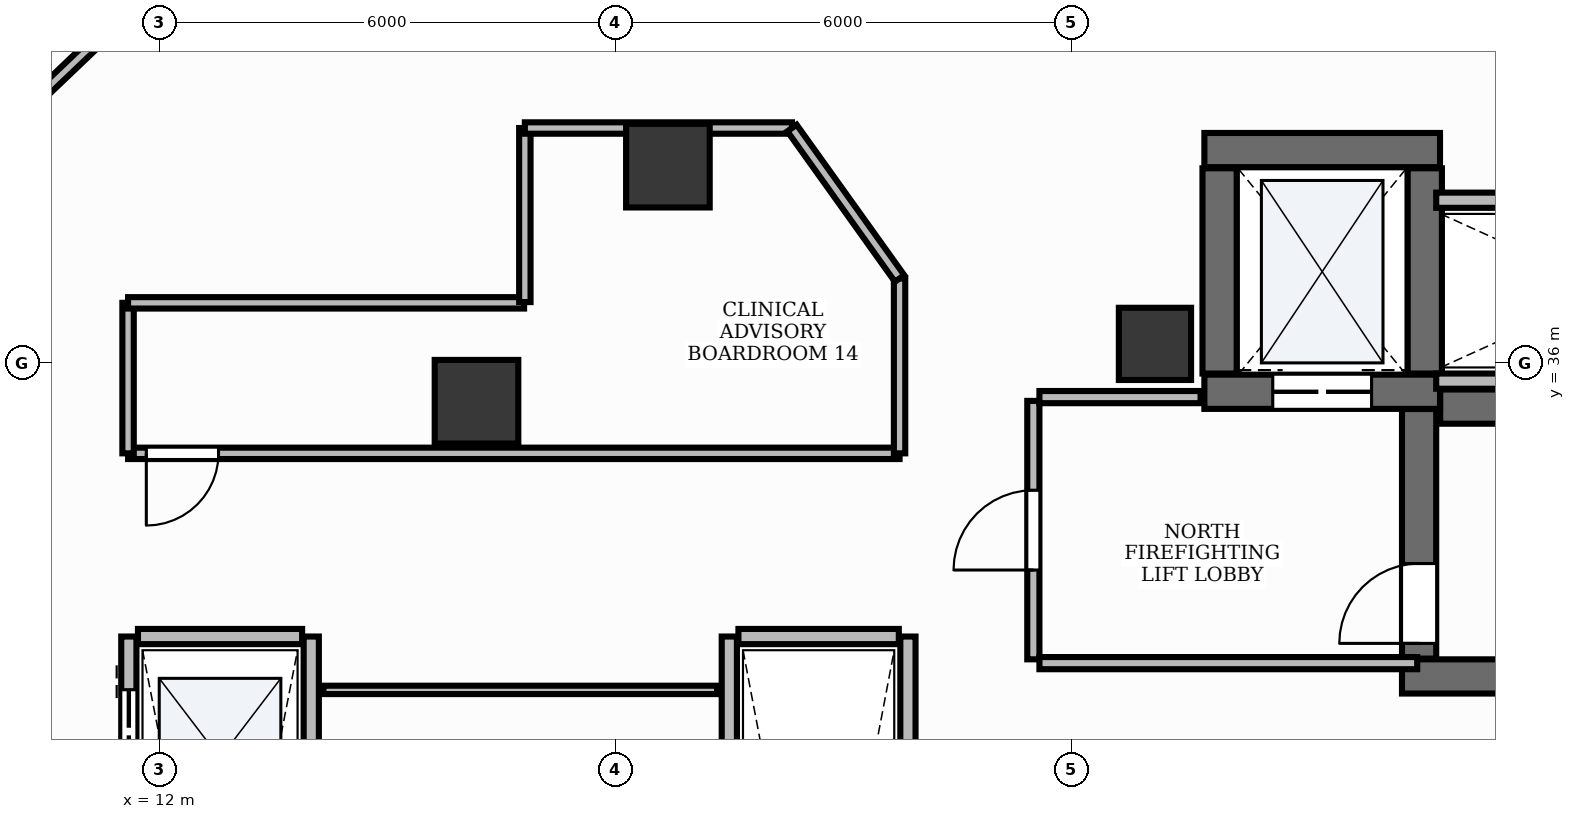
"""IFC4 building model, lengths in metres.
Left out: names, types, materials, properties, quantities, classifications, styles, units other than length and angle.
Written with IfcOpenShell. Run it as: python <this file> out.ifc"""

import sys

from ifc_helpers import new_model, si_unit, direction, frame, frame_2d, origin, origin_2d, place, context, subcontext, project, spatial, rectangle, extrude, element, fill, save


model = new_model("IFC4")
c1 = context("Model", 3, precision=1e-05, world=origin(), true_north=direction((0.0, 1.0)))
c2 = subcontext(c1, "Body", "Model", "MODEL_VIEW")
j1 = project(units=[si_unit("LENGTHUNIT", "METRE"), si_unit("PLANEANGLEUNIT", "RADIAN")], contexts=[c1])
p1 = place(None, origin())
s1 = spatial("IfcSite", under=j1, at=p1, CompositionType="ELEMENT")
p2 = place(p1, origin())
s2 = spatial("IfcBuilding", under=s1, at=p2, CompositionType="ELEMENT")
p3 = place(p2, frame((0.0, 0.0, 38.4)))
s3 = spatial("IfcBuildingStorey", under=s2, at=p3, CompositionType="ELEMENT", Elevation=38.4)
p4 = place(p3, frame((28.852, 35.425, 0.0), z_axis=(0.0, 0.0, 1.0), x_axis=(1.0, 0.0, 0.0)))
e1 = element("IfcWall", 1, at=p4, inside=s3, PredefinedType="SHEAR", context=c2, shape_type="SweptSolid", body=[
    extrude(rectangle(XDim=8.248, YDim=0.45, at=frame_2d((4.124, 0.0))), origin(), (0.0, 0.0, 1.0), 3.9),
])
p5 = place(p3, frame((28.35, 31.875, 0.0), z_axis=(0.0, 0.0, 1.0), x_axis=(1.0, 0.0, 0.0)))
e2 = element("IfcWall", 2, at=p5, inside=s3, PredefinedType="SHEAR", context=c2, shape_type="SweptSolid", body=[
    extrude(rectangle(XDim=8.75, YDim=0.45, at=frame_2d((4.375, 0.0))), origin(), (0.0, 0.0, 1.0), 3.9),
])
p6 = place(p3, frame((28.575, 32.11, 0.0), z_axis=(0.0, 0.0, 1.0), x_axis=(0.0, 1.0, 0.0)))
e3 = element("IfcWall", 3, at=p6, inside=s3, PredefinedType="SHEAR", context=c2, shape_type="SweptSolid", body=[
    extrude(rectangle(XDim=3.283, YDim=0.45, at=frame_2d((1.642, 0.0))), origin(), (0.0, 0.0, 1.0), 3.9),
])
p7 = place(p6, frame((0.2, 0.0, 0.0)))
e4 = element("IfcOpeningElement", 4, at=p7, cuts=e3, PredefinedType="OPENING", context=c2, shape_type="SweptSolid", body=[
    extrude(rectangle(XDim=1.05, YDim=2.15, at=frame_2d((0.525, 1.075))), frame((0.0, 0.24, 0.0), z_axis=(0.0, -1.0, 0.0), x_axis=(1.0, 0.0, 0.0)), (0.0, 0.0, 1.0), 0.48),
])
p8 = place(p3, frame((25.75, 38.8, 0.0), z_axis=(0.0, 0.0, 1.0), x_axis=(1.0, 0.0, 0.0)))
e5 = element("IfcWall", 5, at=p8, inside=s3, PredefinedType="SHEAR", context=c2, shape_type="SweptSolid", body=[
    extrude(rectangle(XDim=3.1, YDim=0.45, at=frame_2d((1.55, 0.0))), origin(), (0.0, 0.0, 1.0), 3.9),
])
p9 = place(p3, frame((25.75, 35.62, 0.0), z_axis=(0.0, 0.0, 1.0), x_axis=(1.0, 0.0, 0.0)))
e6 = element("IfcWall", 6, at=p9, inside=s3, PredefinedType="SHEAR", context=c2, shape_type="SweptSolid", body=[
    extrude(rectangle(XDim=3.1, YDim=0.45, at=frame_2d((1.55, 0.0))), origin(), (0.0, 0.0, 1.0), 3.9),
])
p10 = place(p9, frame((0.9, 0.0, 0.0)))
e7 = element("IfcOpeningElement", 7, at=p10, cuts=e6, PredefinedType="OPENING", context=c2, shape_type="SweptSolid", body=[
    extrude(rectangle(XDim=1.3, YDim=2.2, at=frame_2d((0.65, 1.1))), frame((0.0, 0.24, 0.0), z_axis=(0.0, -1.0, 0.0), x_axis=(1.0, 0.0, 0.0)), (0.0, 0.0, 1.0), 0.48),
])
for number, where, z_axis, x_axis in (
    (8, (25.95, 35.86, 0.0), (0.0, 0.0, 1.0), (0.0, 1.0, 0.0)),
    (9, (28.65, 35.86, 0.0), (0.0, 0.0, 1.0), (0.0, 1.0, 0.0)),
):
    element("IfcWall", number, at=place(p3, frame(where, z_axis=z_axis, x_axis=x_axis)), inside=s3, PredefinedType="SHEAR", context=c2, shape_type="SweptSolid", body=[
        extrude(rectangle(XDim=2.7, YDim=0.45, at=frame_2d((1.35, 0.0))), origin(), (0.0, 0.0, 1.0), 3.9),
    ])
p11 = place(p3, frame((25.1, 36.25, -0.0), z_axis=(0.0, 0.0, 1.0), x_axis=(1.0, 0.0, 0.0)))
e10 = element("IfcColumn", 10, at=p11, inside=s3, PredefinedType="PILASTER", context=c2, shape_type="SweptSolid", body=[
    extrude(rectangle(XDim=0.95, YDim=0.95, at=origin_2d()), origin(), (0.0, 0.0, 1.0), 3.901),
])
for number, where, z_axis, x_axis in (
    (11, (18.692, 38.595, -0.0), (0.0, 0.0, 1.0), (1.0, 0.0, 0.0)),
    (12, (16.174, 35.489, -0.0), (0.0, 0.0, 1.0), (1.0, 0.0, 0.0)),
):
    element("IfcColumn", number, at=place(p3, frame(where, z_axis=z_axis, x_axis=x_axis)), inside=s3, PredefinedType="COLUMN", context=c2, shape_type="SweptSolid", body=[
        extrude(rectangle(XDim=1.1, YDim=1.1, at=origin_2d()), origin(), (0.0, 0.0, 1.0), 3.901),
    ])
p12 = place(p3, frame((11.6, 21.6, 0.0), z_axis=(0.0, 0.0, 1.0), x_axis=(0.0, 1.0, 0.0)))
e13 = element("IfcWall", 13, at=p12, inside=s3, PredefinedType="PARTITIONING", context=c2, shape_type="SweptSolid", body=[
    extrude(rectangle(XDim=10.8, YDim=0.2, at=frame_2d((5.4, 0.0))), origin(), (0.0, 0.0, 1.0), 2.91),
])
p13 = place(p12, frame((0.9, 0.0, 0.0)))
e14 = element("IfcOpeningElement", 14, at=p13, cuts=e13, PredefinedType="OPENING", context=c2, shape_type="SweptSolid", body=[
    extrude(rectangle(XDim=1.1, YDim=2.2, at=frame_2d((0.55, 1.1))), frame((0.0, 0.115, 0.0), z_axis=(0.0, -1.0, 0.0), x_axis=(1.0, 0.0, 0.0)), (0.0, 0.0, 1.0), 0.23),
])
p14 = place(p12, frame((3.6, 0.0, 0.0)))
e15 = element("IfcOpeningElement", 15, at=p14, cuts=e13, PredefinedType="OPENING", context=c2, shape_type="SweptSolid", body=[
    extrude(rectangle(XDim=1.1, YDim=2.2, at=frame_2d((0.55, 1.1))), frame((0.0, 0.115, 0.0), z_axis=(0.0, -1.0, 0.0), x_axis=(1.0, 0.0, 0.0)), (0.0, 0.0, 1.0), 0.23),
])
p15 = place(p12, frame((6.3, 0.0, 0.0)))
e16 = element("IfcOpeningElement", 16, at=p15, cuts=e13, PredefinedType="OPENING", context=c2, shape_type="SweptSolid", body=[
    extrude(rectangle(XDim=1.1, YDim=2.2, at=frame_2d((0.55, 1.1))), frame((0.0, 0.115, 0.0), z_axis=(0.0, -1.0, 0.0), x_axis=(1.0, 0.0, 0.0)), (0.0, 0.0, 1.0), 0.23),
])
p16 = place(p12, frame((9.0, 0.0, 0.0)))
e17 = element("IfcOpeningElement", 17, at=p16, cuts=e13, PredefinedType="OPENING", context=c2, shape_type="SweptSolid", body=[
    extrude(rectangle(XDim=1.1, YDim=2.2, at=frame_2d((0.55, 1.1))), frame((0.0, 0.115, 0.0), z_axis=(0.0, -1.0, 0.0), x_axis=(1.0, 0.0, 0.0)), (0.0, 0.0, 1.0), 0.23),
])
p17 = place(p3, frame((14.0, 21.6, 0.0), z_axis=(0.0, 0.0, 1.0), x_axis=(0.0, 1.0, 0.0)))
e18 = element("IfcWall", 18, at=p17, inside=s3, PredefinedType="PARTITIONING", context=c2, shape_type="SweptSolid", body=[
    extrude(rectangle(XDim=10.8, YDim=0.2, at=frame_2d((5.4, 0.0))), origin(), (0.0, 0.0, 1.0), 2.91),
])
p18 = place(p3, frame((11.72, 32.4, 0.0), z_axis=(0.0, 0.0, 1.0), x_axis=(1.0, 0.0, 0.0)))
e19 = element("IfcWall", 19, at=p18, inside=s3, PredefinedType="PARTITIONING", context=c2, shape_type="SweptSolid", body=[
    extrude(rectangle(XDim=2.16, YDim=0.2, at=frame_2d((1.08, 0.0))), origin(), (0.0, 0.0, 1.0), 2.91),
])
for number, where, z_axis, x_axis in (
    (20, (19.5, 21.6, 0.0), (0.0, 0.0, 1.0), (0.0, 1.0, 0.0)),
    (21, (21.85, 21.6, 0.0), (0.0, 0.0, 1.0), (0.0, 1.0, 0.0)),
):
    element("IfcWall", number, at=place(p3, frame(where, z_axis=z_axis, x_axis=x_axis)), inside=s3, PredefinedType="PARTITIONING", context=c2, shape_type="SweptSolid", body=[
        extrude(rectangle(XDim=10.8, YDim=0.2, at=frame_2d((5.4, 0.0))), origin(), (0.0, 0.0, 1.0), 2.91),
    ])
p19 = place(p3, frame((19.62, 32.4, 0.0), z_axis=(0.0, 0.0, 1.0), x_axis=(1.0, 0.0, 0.0)))
e22 = element("IfcWall", 22, at=p19, inside=s3, PredefinedType="PARTITIONING", context=c2, shape_type="SweptSolid", body=[
    extrude(rectangle(XDim=2.11, YDim=0.2, at=frame_2d((1.055, 0.0))), origin(), (0.0, 0.0, 1.0), 2.91),
])
for number, where, z_axis, x_axis in (
    (23, (28.8, 35.76, 0.0), (0.0, 0.0, 1.0), (1.0, 0.0, 0.0)),
    (24, (28.8, 38.14, 0.0), (0.0, 0.0, 1.0), (1.0, 0.0, 0.0)),
):
    element("IfcWall", number, at=place(p3, frame(where, z_axis=z_axis, x_axis=x_axis)), inside=s3, PredefinedType="PARTITIONING", context=c2, shape_type="SweptSolid", body=[
        extrude(rectangle(XDim=4.57, YDim=0.2, at=frame_2d((2.285, 0.0))), origin(), (0.0, 0.0, 1.0), 2.91),
    ])
p20 = place(p3, frame((23.5, 32.1, 0.0), z_axis=(0.0, 0.0, 1.0), x_axis=(0.0, 1.0, 0.0)))
e25 = element("IfcWall", 25, at=p20, inside=s3, PredefinedType="PARTITIONING", context=c2, shape_type="SweptSolid", body=[
    extrude(rectangle(XDim=3.4, YDim=0.16, at=frame_2d((1.7, 0.0))), origin(), (0.0, 0.0, 1.0), 2.91),
])
p21 = place(p20, frame((1.175, 0.0, 0.0)))
e26 = element("IfcOpeningElement", 26, at=p21, cuts=e25, PredefinedType="OPENING", context=c2, shape_type="SweptSolid", body=[
    extrude(rectangle(XDim=1.05, YDim=2.15, at=frame_2d((0.525, 1.075))), frame((0.0, 0.095, 0.0), z_axis=(0.0, -1.0, 0.0), x_axis=(1.0, 0.0, 0.0)), (0.0, 0.0, 1.0), 0.19),
])
p22 = place(p3, frame((23.58, 32.05, 0.0), z_axis=(0.0, 0.0, 1.0), x_axis=(1.0, 0.0, 0.0)))
e27 = element("IfcWall", 27, at=p22, inside=s3, PredefinedType="PARTITIONING", context=c2, shape_type="SweptSolid", body=[
    extrude(rectangle(XDim=4.97, YDim=0.16, at=frame_2d((2.485, 0.0))), origin(), (0.0, 0.0, 1.0), 2.91),
])
p23 = place(p3, frame((23.58, 35.55, 0.0), z_axis=(0.0, 0.0, 1.0), x_axis=(1.0, 0.0, 0.0)))
e28 = element("IfcWall", 28, at=p23, inside=s3, PredefinedType="PARTITIONING", context=c2, shape_type="SweptSolid", body=[
    extrude(rectangle(XDim=2.12, YDim=0.16, at=frame_2d((1.06, 0.0))), origin(), (0.0, 0.0, 1.0), 2.91),
])
p24 = place(p3, frame((21.74, 34.81, 0.0), z_axis=(0.0, 0.0, 1.0), x_axis=(-1.0, 0.0, 0.0)))
e29 = element("IfcWall", 29, at=p24, inside=s3, PredefinedType="PARTITIONING", context=c2, shape_type="SweptSolid", body=[
    extrude(rectangle(XDim=10.15, YDim=0.15, at=frame_2d((5.075, 0.0))), origin(), (0.0, 0.0, 1.0), 2.91),
])
p25 = place(p24, frame((8.96, 0.0, 0.0)))
e30 = element("IfcOpeningElement", 30, at=p25, cuts=e29, PredefinedType="OPENING", context=c2, shape_type="SweptSolid", body=[
    extrude(rectangle(XDim=0.95, YDim=2.15, at=frame_2d((0.475, 1.075))), frame((0.0, 0.09, 0.0), z_axis=(0.0, -1.0, 0.0), x_axis=(1.0, 0.0, 0.0)), (0.0, 0.0, 1.0), 0.18),
])
p26 = place(p3, frame((14.16, 31.698, 0.0), z_axis=(0.0, 0.0, 1.0), x_axis=(1.0, 0.0, 0.0)))
e31 = element("IfcWall", 31, at=p26, inside=s3, PredefinedType="MOVABLE", context=c2, shape_type="SweptSolid", body=[
    extrude(rectangle(XDim=5.18, YDim=0.11, at=frame_2d((2.59, 0.0))), origin(), (0.0, 0.0, 1.0), 2.91),
])
p27 = place(p3, frame((21.74, 37.111, 0.0), z_axis=(0.0, 0.0, 1.0), x_axis=(0.0, -1.0, 0.0)))
e32 = element("IfcWall", 32, at=p27, inside=s3, PredefinedType="PARTITIONING", context=c2, shape_type="SweptSolid", body=[
    extrude(rectangle(XDim=2.301, YDim=0.15, at=frame_2d((1.15, 0.0))), origin(), (0.0, 0.0, 1.0), 2.91),
])
p28 = place(p3, frame((11.59, 34.81, 0.0), z_axis=(0.0, 0.0, 1.0), x_axis=(0.0, 1.0, 0.0)))
e33 = element("IfcWall", 33, at=p28, inside=s3, PredefinedType="PARTITIONING", context=c2, shape_type="SweptSolid", body=[
    extrude(rectangle(XDim=1.98, YDim=0.15, at=frame_2d((0.99, 0.0))), origin(), (0.0, 0.0, 1.0), 2.91),
])
p29 = place(p3, frame((11.59, 36.79, 0.0), z_axis=(0.0, 0.0, 1.0), x_axis=(1.0, 0.0, 0.0)))
e34 = element("IfcWall", 34, at=p29, inside=s3, PredefinedType="PARTITIONING", context=c2, shape_type="SweptSolid", body=[
    extrude(rectangle(XDim=5.21, YDim=0.15, at=frame_2d((2.605, 0.0))), origin(), (0.0, 0.0, 1.0), 2.91),
])
p30 = place(p3, frame((16.81, 36.8, 0.0), z_axis=(0.0, 0.0, 1.0), x_axis=(0.0, 1.0, 0.0)))
e35 = element("IfcWall", 35, at=p30, inside=s3, PredefinedType="PARTITIONING", context=c2, shape_type="SweptSolid", body=[
    extrude(rectangle(XDim=2.29, YDim=0.15, at=frame_2d((1.145, 0.0))), origin(), (0.0, 0.0, 1.0), 2.91),
])
p31 = place(p3, frame((16.81, 39.09, 0.0), z_axis=(0.0, 0.0, 1.0), x_axis=(1.0, 0.0, 0.0)))
e36 = element("IfcWall", 36, at=p31, inside=s3, PredefinedType="PARTITIONING", context=c2, shape_type="SweptSolid", body=[
    extrude(rectangle(XDim=3.515, YDim=0.15, at=frame_2d((1.757, 0.0))), origin(), (0.0, 0.0, 1.0), 2.91),
])
p32 = place(p3, frame((20.325, 39.09, 0.0), z_axis=(0.0, 0.0, 1.0), x_axis=(0.581703214005, -0.813401113115, 0.0)))
e37 = element("IfcWall", 37, at=p32, inside=s3, PredefinedType="PARTITIONING", context=c2, shape_type="SweptSolid", body=[
    extrude(rectangle(XDim=2.433, YDim=0.15, at=frame_2d((1.217, 0.0))), origin(), (0.0, 0.0, 1.0), 2.91),
])
p33 = place(p3, frame((11.307, 40.358, 0.0), z_axis=(0.0, 0.0, 1.0), x_axis=(-0.723655021688, -0.690161872017, 0.0)))
e38 = element("IfcWall", 38, at=p33, inside=s3, PredefinedType="PARTITIONING", context=c2, shape_type="SweptSolid", body=[
    extrude(rectangle(XDim=2.406, YDim=0.15, at=frame_2d((1.203, 0.0))), origin(), (0.0, 0.0, 1.0), 2.91),
])
p34 = place(p7, origin())
e39 = element("IfcDoor", 39, at=p34, inside=s3, OperationType="SINGLE_SWING_LEFT", PredefinedType="DOOR", context=c2, shape_type="SweptSolid", body=[
    extrude(rectangle(XDim=1.05, YDim=2.15, at=frame_2d((0.525, 1.075))), frame((0.0, 0.025, 0.0), z_axis=(0.0, -1.0, 0.0), x_axis=(1.0, 0.0, 0.0)), (0.0, 0.0, 1.0), 0.05),
])
fill(e4, e39)
p35 = place(p16, origin())
e40 = element("IfcDoor", 40, at=p35, inside=s3, OperationType="DOUBLE_DOOR_SLIDING", PredefinedType="DOOR", context=c2, shape_type="SweptSolid", body=[
    extrude(rectangle(XDim=1.1, YDim=2.2, at=frame_2d((0.55, 1.1))), frame((0.0, 0.025, 0.0), z_axis=(0.0, -1.0, 0.0), x_axis=(1.0, 0.0, 0.0)), (0.0, 0.0, 1.0), 0.05),
])
fill(e17, e40)
p36 = place(p10, origin())
e41 = element("IfcDoor", 41, at=p36, inside=s3, OperationType="DOUBLE_DOOR_SLIDING", PredefinedType="DOOR", context=c2, shape_type="SweptSolid", body=[
    extrude(rectangle(XDim=1.3, YDim=2.2, at=frame_2d((0.65, 1.1))), frame((0.0, 0.025, 0.0), z_axis=(0.0, -1.0, 0.0), x_axis=(1.0, 0.0, 0.0)), (0.0, 0.0, 1.0), 0.05),
])
fill(e7, e41)
p37 = place(p21, origin())
e42 = element("IfcDoor", 42, at=p37, inside=s3, OperationType="SINGLE_SWING_LEFT", PredefinedType="DOOR", context=c2, shape_type="SweptSolid", body=[
    extrude(rectangle(XDim=1.05, YDim=2.15, at=frame_2d((0.525, 1.075))), frame((0.0, 0.025, 0.0), z_axis=(0.0, -1.0, 0.0), x_axis=(1.0, 0.0, 0.0)), (0.0, 0.0, 1.0), 0.05),
])
fill(e26, e42)
p38 = place(p25, origin())
e43 = element("IfcDoor", 43, at=p38, inside=s3, OperationType="SINGLE_SWING_RIGHT", PredefinedType="DOOR", context=c2, shape_type="SweptSolid", body=[
    extrude(rectangle(XDim=0.95, YDim=2.15, at=frame_2d((0.475, 1.075))), frame((0.0, 0.025, 0.0), z_axis=(0.0, -1.0, 0.0), x_axis=(1.0, 0.0, 0.0)), (0.0, 0.0, 1.0), 0.05),
])
fill(e30, e43)
save(model, sys.argv[1])
